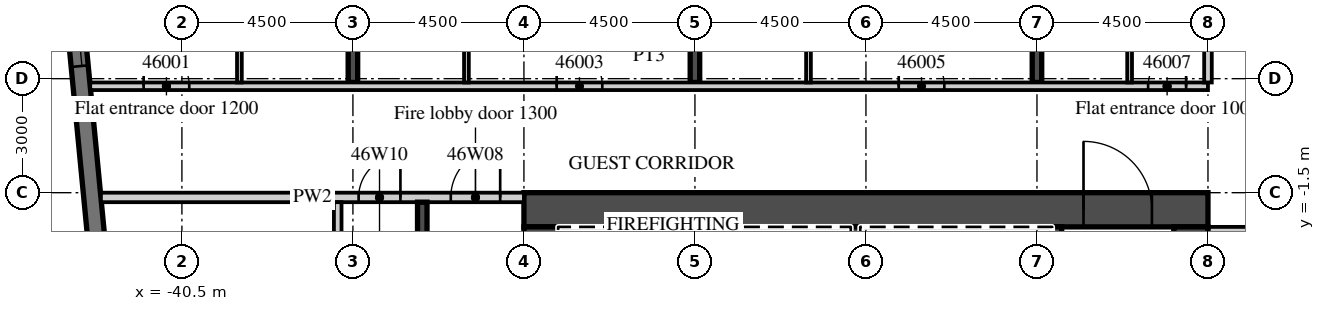
"""IFC4 building model, lengths in metres.
Left out: names, types, materials, properties, quantities, classifications, styles, units other than length and angle.
Written with IfcOpenShell. Run it as: python <this file> out.ifc"""

import sys

from ifc_helpers import new_model, si_unit, direction, frame, frame_2d, origin, place, context, subcontext, project, spatial, rectangle, extrude, element, fill, save


model = new_model("IFC4")
c1 = context("Model", 3, precision=1e-05, world=origin(), true_north=direction((0.0, 1.0)))
c2 = subcontext(c1, "Body", "Model", "MODEL_VIEW")
j1 = project(units=[si_unit("LENGTHUNIT", "METRE"), si_unit("PLANEANGLEUNIT", "RADIAN")], contexts=[c1])
p1 = place(None, origin())
s1 = spatial("IfcSite", under=j1, at=p1, CompositionType="ELEMENT")
p2 = place(p1, origin())
s2 = spatial("IfcBuilding", under=s1, at=p2, CompositionType="ELEMENT")
p3 = place(p2, frame((0.0, 0.0, 193.3)))
s3 = spatial("IfcBuildingStorey", under=s2, at=p3, CompositionType="ELEMENT", Elevation=193.3)
p4 = place(p3, frame((-36.0, 1.4, 0.0), z_axis=(0.0, 0.0, 1.0), x_axis=(0.0, 1.0, 0.0)))
e1 = element("IfcWall", 1, at=p4, inside=s3, PredefinedType="SHEAR", context=c2, shape_type="SweptSolid", body=[
    extrude(rectangle(XDim=15.401, YDim=0.25, at=frame_2d((7.701, 0.0))), origin(), (0.0, 0.0, 1.0), 3.3),
])
p5 = place(p3, frame((-27.0, 1.4, 0.0), z_axis=(0.0, 0.0, 1.0), x_axis=(0.0, 1.0, 0.0)))
e2 = element("IfcWall", 2, at=p5, inside=s3, PredefinedType="SHEAR", context=c2, shape_type="SweptSolid", body=[
    extrude(rectangle(XDim=16.268, YDim=0.25, at=frame_2d((8.134, 0.0))), origin(), (0.0, 0.0, 1.0), 3.3),
])
p6 = place(p3, frame((-18.0, 1.4, 0.0), z_axis=(0.0, 0.0, 1.0), x_axis=(0.0, 1.0, 0.0)))
e3 = element("IfcWall", 3, at=p6, inside=s3, PredefinedType="SHEAR", context=c2, shape_type="SweptSolid", body=[
    extrude(rectangle(XDim=17.134, YDim=0.25, at=frame_2d((8.567, 0.0))), origin(), (0.0, 0.0, 1.0), 3.3),
])
p7 = place(p3, frame((-44.214, 12.466, 0.0), z_axis=(0.0, 0.0, 1.0), x_axis=(0.095847314626, -0.995396047952, 0.0)))
e4 = element("IfcWall", 4, at=p7, inside=s3, PredefinedType="SOLIDWALL", context=c2, shape_type="SweptSolid", body=[
    extrude(rectangle(XDim=34.0, YDim=0.45, at=frame_2d((17.0, 0.0))), origin(), (0.0, 0.0, 1.0), 3.02),
])
p8 = place(p7, frame((2.865, 0.0, 0.45)))
e5 = element("IfcOpeningElement", 5, at=p8, cuts=e4, PredefinedType="OPENING", context=c2, shape_type="SweptSolid", body=[
    extrude(rectangle(XDim=3.3, YDim=2.25, at=frame_2d((1.65, 1.125))), frame((0.0, 0.235, 0.0), z_axis=(0.0, -1.0, 0.0), x_axis=(1.0, 0.0, 0.0)), (0.0, 0.0, 1.0), 0.47),
])
p9 = place(p7, frame((7.386, 0.0, 0.45)))
e6 = element("IfcOpeningElement", 6, at=p9, cuts=e4, PredefinedType="OPENING", context=c2, shape_type="SweptSolid", body=[
    extrude(rectangle(XDim=3.3, YDim=2.25, at=frame_2d((1.65, 1.125))), frame((0.0, 0.235, 0.0), z_axis=(0.0, -1.0, 0.0), x_axis=(1.0, 0.0, 0.0)), (0.0, 0.0, 1.0), 0.47),
])
p10 = place(p3, frame((-42.913, 1.3, 0.0), z_axis=(0.0, 0.0, 1.0), x_axis=(1.0, 0.0, 0.0)))
e7 = element("IfcWall", 7, at=p10, inside=s3, PredefinedType="PARTITIONING", context=c2, shape_type="SweptSolid", body=[
    extrude(rectangle(XDim=29.413, YDim=0.2, at=frame_2d((14.707, 0.0))), origin(), (0.0, 0.0, 1.0), 3.02),
])
p11 = place(p10, frame((1.406, 0.0, 0.0)))
e8 = element("IfcOpeningElement", 8, at=p11, cuts=e7, PredefinedType="OPENING", context=c2, shape_type="SweptSolid", body=[
    extrude(rectangle(XDim=1.2, YDim=2.1, at=frame_2d((0.6, 1.05))), frame((0.0, 0.11, 0.0), z_axis=(0.0, -1.0, 0.0), x_axis=(1.0, 0.0, 0.0)), (0.0, 0.0, 1.0), 0.22),
])
p12 = place(p10, frame((12.275, 0.0, 0.0)))
e9 = element("IfcOpeningElement", 9, at=p12, cuts=e7, PredefinedType="OPENING", context=c2, shape_type="SweptSolid", body=[
    extrude(rectangle(XDim=1.2, YDim=2.1, at=frame_2d((0.6, 1.05))), frame((0.0, 0.11, 0.0), z_axis=(0.0, -1.0, 0.0), x_axis=(1.0, 0.0, 0.0)), (0.0, 0.0, 1.0), 0.22),
])
p13 = place(p10, frame((21.275, 0.0, 0.0)))
e10 = element("IfcOpeningElement", 10, at=p13, cuts=e7, PredefinedType="OPENING", context=c2, shape_type="SweptSolid", body=[
    extrude(rectangle(XDim=1.2, YDim=2.1, at=frame_2d((0.6, 1.05))), frame((0.0, 0.11, 0.0), z_axis=(0.0, -1.0, 0.0), x_axis=(1.0, 0.0, 0.0)), (0.0, 0.0, 1.0), 0.22),
])
p14 = place(p10, frame((27.838, 0.0, 0.0)))
e11 = element("IfcOpeningElement", 11, at=p14, cuts=e7, PredefinedType="OPENING", context=c2, shape_type="SweptSolid", body=[
    extrude(rectangle(XDim=1.0, YDim=2.1, at=frame_2d((0.5, 1.05))), frame((0.0, 0.11, 0.0), z_axis=(0.0, -1.0, 0.0), x_axis=(1.0, 0.0, 0.0)), (0.0, 0.0, 1.0), 0.22),
])
p15 = place(p3, frame((-38.987, 1.4, 0.0), z_axis=(0.0, 0.0, 1.0), x_axis=(0.0, 1.0, 0.0)))
e12 = element("IfcWall", 12, at=p15, inside=s3, PredefinedType="PARTITIONING", context=c2, shape_type="SweptSolid", body=[
    extrude(rectangle(XDim=4.028, YDim=0.125, at=frame_2d((2.014, 0.0))), origin(), (0.0, 0.0, 1.0), 3.02),
])
p16 = place(p15, frame((2.45, 0.0, 0.0)))
e13 = element("IfcOpeningElement", 13, at=p16, cuts=e12, PredefinedType="OPENING", context=c2, shape_type="SweptSolid", body=[
    extrude(rectangle(XDim=0.9, YDim=2.1, at=frame_2d((0.45, 1.05))), frame((0.0, 0.073, 0.0), z_axis=(0.0, -1.0, 0.0), x_axis=(1.0, 0.0, 0.0)), (0.0, 0.0, 1.0), 0.145),
])
p17 = place(p3, frame((-33.013, 1.4, 0.0), z_axis=(0.0, 0.0, 1.0), x_axis=(0.0, 1.0, 0.0)))
e14 = element("IfcWall", 14, at=p17, inside=s3, PredefinedType="PARTITIONING", context=c2, shape_type="SweptSolid", body=[
    extrude(rectangle(XDim=7.225, YDim=0.125, at=frame_2d((3.613, 0.0))), origin(), (0.0, 0.0, 1.0), 3.02),
])
p18 = place(p17, frame((2.45, 0.0, 0.0)))
e15 = element("IfcOpeningElement", 15, at=p18, cuts=e14, PredefinedType="OPENING", context=c2, shape_type="SweptSolid", body=[
    extrude(rectangle(XDim=0.9, YDim=2.1, at=frame_2d((0.45, 1.05))), frame((0.0, 0.073, 0.0), z_axis=(0.0, -1.0, 0.0), x_axis=(1.0, 0.0, 0.0)), (0.0, 0.0, 1.0), 0.145),
])
p19 = place(p3, frame((-24.012, 1.4, 0.0), z_axis=(0.0, 0.0, 1.0), x_axis=(0.0, 1.0, 0.0)))
e16 = element("IfcWall", 16, at=p19, inside=s3, PredefinedType="PARTITIONING", context=c2, shape_type="SweptSolid", body=[
    extrude(rectangle(XDim=7.225, YDim=0.125, at=frame_2d((3.613, 0.0))), origin(), (0.0, 0.0, 1.0), 3.02),
])
p20 = place(p19, frame((2.45, 0.0, 0.0)))
e17 = element("IfcOpeningElement", 17, at=p20, cuts=e16, PredefinedType="OPENING", context=c2, shape_type="SweptSolid", body=[
    extrude(rectangle(XDim=0.9, YDim=2.1, at=frame_2d((0.45, 1.05))), frame((0.0, 0.073, 0.0), z_axis=(0.0, -1.0, 0.0), x_axis=(1.0, 0.0, 0.0)), (0.0, 0.0, 1.0), 0.145),
])
p21 = place(p3, frame((-13.5, 1.4, 0.0), z_axis=(0.0, 0.0, 1.0), x_axis=(0.0, 1.0, 0.0)))
e18 = element("IfcWall", 18, at=p21, inside=s3, PredefinedType="PARTITIONING", context=c2, shape_type="SweptSolid", body=[
    extrude(rectangle(XDim=17.59, YDim=0.2, at=frame_2d((8.795, 0.0))), origin(), (0.0, 0.0, 1.0), 3.02),
])
p22 = place(p3, frame((-15.562, 1.4, 0.0), z_axis=(0.0, 0.0, 1.0), x_axis=(0.0, 1.0, 0.0)))
e19 = element("IfcWall", 19, at=p22, inside=s3, PredefinedType="PARTITIONING", context=c2, shape_type="SweptSolid", body=[
    extrude(rectangle(XDim=7.225, YDim=0.125, at=frame_2d((3.613, 0.0))), origin(), (0.0, 0.0, 1.0), 3.02),
])
p23 = place(p22, frame((2.45, 0.0, 0.0)))
e20 = element("IfcOpeningElement", 20, at=p23, cuts=e19, PredefinedType="OPENING", context=c2, shape_type="SweptSolid", body=[
    extrude(rectangle(XDim=0.9, YDim=2.1, at=frame_2d((0.45, 1.05))), frame((0.0, 0.073, 0.0), z_axis=(0.0, -1.0, 0.0), x_axis=(1.0, 0.0, 0.0)), (0.0, 0.0, 1.0), 0.145),
])
p24 = place(p3, frame((-13.5, -2.5, 0.0), z_axis=(0.0, 0.0, 1.0), x_axis=(1.0, 0.0, 0.0)))
e21 = element("IfcWall", 21, at=p24, inside=s3, PredefinedType="PARTITIONING", context=c2, shape_type="SweptSolid", body=[
    extrude(rectangle(XDim=27.0, YDim=0.2, at=frame_2d((13.5, 0.0))), origin(), (0.0, 0.0, 1.0), 3.02),
])
p25 = place(p24, frame((2.925, 0.0, 0.0)))
e22 = element("IfcOpeningElement", 22, at=p25, cuts=e21, PredefinedType="OPENING", context=c2, shape_type="SweptSolid", body=[
    extrude(rectangle(XDim=1.0, YDim=2.1, at=frame_2d((0.5, 1.05))), frame((0.0, 0.11, 0.0), z_axis=(0.0, -1.0, 0.0), x_axis=(1.0, 0.0, 0.0)), (0.0, 0.0, 1.0), 0.22),
])
p26 = place(p24, frame((5.075, 0.0, 0.0)))
e23 = element("IfcOpeningElement", 23, at=p26, cuts=e21, PredefinedType="OPENING", context=c2, shape_type="SweptSolid", body=[
    extrude(rectangle(XDim=1.0, YDim=2.1, at=frame_2d((0.5, 1.05))), frame((0.0, 0.11, 0.0), z_axis=(0.0, -1.0, 0.0), x_axis=(1.0, 0.0, 0.0)), (0.0, 0.0, 1.0), 0.22),
])
p27 = place(p24, frame((11.925, 0.0, 0.0)))
e24 = element("IfcOpeningElement", 24, at=p27, cuts=e21, PredefinedType="OPENING", context=c2, shape_type="SweptSolid", body=[
    extrude(rectangle(XDim=1.0, YDim=2.1, at=frame_2d((0.5, 1.05))), frame((0.0, 0.11, 0.0), z_axis=(0.0, -1.0, 0.0), x_axis=(1.0, 0.0, 0.0)), (0.0, 0.0, 1.0), 0.22),
])
p28 = place(p24, frame((15.938, 0.0, 0.0)))
e25 = element("IfcOpeningElement", 25, at=p28, cuts=e21, PredefinedType="OPENING", context=c2, shape_type="SweptSolid", body=[
    extrude(rectangle(XDim=1.2, YDim=2.1, at=frame_2d((0.6, 1.05))), frame((0.0, 0.11, 0.0), z_axis=(0.0, -1.0, 0.0), x_axis=(1.0, 0.0, 0.0)), (0.0, 0.0, 1.0), 0.22),
])
p29 = place(p24, frame((25.425, 0.0, 0.0)))
e26 = element("IfcOpeningElement", 26, at=p29, cuts=e21, PredefinedType="OPENING", context=c2, shape_type="SweptSolid", body=[
    extrude(rectangle(XDim=1.0, YDim=2.1, at=frame_2d((0.5, 1.05))), frame((0.0, 0.11, 0.0), z_axis=(0.0, -1.0, 0.0), x_axis=(1.0, 0.0, 0.0)), (0.0, 0.0, 1.0), 0.22),
])
p30 = place(p3, frame((-31.5, -1.95, 0.0), z_axis=(0.0, 0.0, 1.0), x_axis=(1.0, 0.0, 0.0)))
e27 = element("IfcWall", 27, at=p30, inside=s3, PredefinedType="SHEAR", context=c2, shape_type="SweptSolid", body=[
    extrude(rectangle(XDim=18.0, YDim=0.9, at=frame_2d((9.0, 0.0))), origin(), (0.0, 0.0, 1.0), 3.02),
])
p31 = place(p30, frame((14.725, 0.0, 0.0)))
e28 = element("IfcOpeningElement", 28, at=p31, cuts=e27, PredefinedType="OPENING", context=c2, shape_type="SweptSolid", body=[
    extrude(rectangle(XDim=1.8, YDim=2.1, at=frame_2d((0.9, 1.05))), frame((0.0, 0.46, 0.0), z_axis=(0.0, -1.0, 0.0), x_axis=(1.0, 0.0, 0.0)), (0.0, 0.0, 1.0), 0.92),
])
p32 = place(p3, frame((-31.05, -15.2, 0.0), z_axis=(0.0, 0.0, 1.0), x_axis=(0.0, 1.0, 0.0)))
e29 = element("IfcWall", 29, at=p32, inside=s3, PredefinedType="SHEAR", context=c2, shape_type="SweptSolid", body=[
    extrude(rectangle(XDim=12.8, YDim=0.9, at=frame_2d((6.4, 0.0))), origin(), (0.0, 0.0, 1.0), 3.02),
])
p33 = place(p32, frame((11.5, 0.0, 0.0)))
e30 = element("IfcOpeningElement", 30, at=p33, cuts=e29, PredefinedType="OPENING", context=c2, shape_type="SweptSolid", body=[
    extrude(rectangle(XDim=1.1, YDim=2.1, at=frame_2d((0.55, 1.05))), frame((0.0, 0.46, 0.0), z_axis=(0.0, -1.0, 0.0), x_axis=(1.0, 0.0, 0.0)), (0.0, 0.0, 1.0), 0.92),
])
p34 = place(p3, frame((-13.95, -14.6, 0.0), z_axis=(0.0, 0.0, 1.0), x_axis=(0.0, 1.0, 0.0)))
e31 = element("IfcWall", 31, at=p34, inside=s3, PredefinedType="SHEAR", context=c2, shape_type="SweptSolid", body=[
    extrude(rectangle(XDim=12.2, YDim=0.9, at=frame_2d((6.1, 0.0))), origin(), (0.0, 0.0, 1.0), 3.02),
])
p35 = place(p3, frame((-17.475, -5.55, 0.0), z_axis=(0.0, 0.0, 1.0), x_axis=(0.0, 1.0, 0.0)))
e32 = element("IfcWall", 32, at=p35, inside=s3, PredefinedType="SHEAR", context=c2, shape_type="SweptSolid", body=[
    extrude(rectangle(XDim=3.15, YDim=0.25, at=frame_2d((1.575, 0.0))), origin(), (0.0, 0.0, 1.0), 3.02),
])
for number, where, z_axis, x_axis in (
    (33, (-27.975, -5.3, 0.0), (0.0, 0.0, 1.0), (0.0, 1.0, 0.0)),
    (34, (-22.775, -5.3, 0.0), (0.0, 0.0, 1.0), (0.0, 1.0, 0.0)),
):
    element("IfcWall", number, at=place(p3, frame(where, z_axis=z_axis, x_axis=x_axis)), inside=s3, PredefinedType="SHEAR", context=c2, shape_type="SweptSolid", body=[
        extrude(rectangle(XDim=2.9, YDim=0.25, at=frame_2d((1.45, 0.0))), origin(), (0.0, 0.0, 1.0), 3.02),
    ])
p36 = place(p3, frame((-42.632, -1.625, 0.0), z_axis=(0.0, 0.0, 1.0), x_axis=(1.0, 0.0, 0.0)))
e35 = element("IfcWall", 35, at=p36, inside=s3, PredefinedType="PARTITIONING", context=c2, shape_type="SweptSolid", body=[
    extrude(rectangle(XDim=11.132, YDim=0.25, at=frame_2d((5.566, 0.0))), origin(), (0.0, 0.0, 1.0), 3.02),
])
p37 = place(p36, frame((9.207, 0.0, 0.0)))
e36 = element("IfcOpeningElement", 36, at=p37, cuts=e35, PredefinedType="OPENING", context=c2, shape_type="SweptSolid", body=[
    extrude(rectangle(XDim=1.3, YDim=2.1, at=frame_2d((0.65, 1.05))), frame((0.0, 0.135, 0.0), z_axis=(0.0, -1.0, 0.0), x_axis=(1.0, 0.0, 0.0)), (0.0, 0.0, 1.0), 0.27),
])
p38 = place(p36, frame((6.781, 0.0, 0.0)))
e37 = element("IfcOpeningElement", 37, at=p38, cuts=e35, PredefinedType="OPENING", context=c2, shape_type="SweptSolid", body=[
    extrude(rectangle(XDim=1.1, YDim=2.1, at=frame_2d((0.55, 1.05))), frame((0.0, 0.135, 0.0), z_axis=(0.0, -1.0, 0.0), x_axis=(1.0, 0.0, 0.0)), (0.0, 0.0, 1.0), 0.27),
])
p39 = place(p3, frame((-34.175, -10.1, 0.0), z_axis=(0.0, 0.0, 1.0), x_axis=(0.0, 1.0, 0.0)))
e38 = element("IfcWall", 38, at=p39, inside=s3, PredefinedType="SHEAR", context=c2, shape_type="SweptSolid", body=[
    extrude(rectangle(XDim=8.35, YDim=0.25, at=frame_2d((4.175, 0.0))), origin(), (0.0, 0.0, 1.0), 3.02),
])
p40 = place(p3, frame((-36.4, -17.7, 0.0), z_axis=(0.0, 0.0, 1.0), x_axis=(0.0, 1.0, 0.0)))
e39 = element("IfcWall", 39, at=p40, inside=s3, PredefinedType="PARTITIONING", context=c2, shape_type="SweptSolid", body=[
    extrude(rectangle(XDim=15.95, YDim=0.2, at=frame_2d((7.975, 0.0))), origin(), (0.0, 0.0, 1.0), 3.02),
])
p41 = place(p40, frame((0.35, 0.0, 0.0)))
e40 = element("IfcOpeningElement", 40, at=p41, cuts=e39, PredefinedType="OPENING", context=c2, shape_type="SweptSolid", body=[
    extrude(rectangle(XDim=0.9, YDim=2.1, at=frame_2d((0.45, 1.05))), frame((0.0, 0.11, 0.0), z_axis=(0.0, -1.0, 0.0), x_axis=(1.0, 0.0, 0.0)), (0.0, 0.0, 1.0), 0.22),
])
p42 = place(p9, origin())
e41 = element("IfcWindow", 41, at=p42, inside=s3, PartitioningType="SINGLE_PANEL", PredefinedType="WINDOW", context=c2, shape_type="SweptSolid", body=[
    extrude(rectangle(XDim=3.3, YDim=2.25, at=frame_2d((1.65, 1.125))), frame((0.0, 0.09, 0.0), z_axis=(0.0, -1.0, 0.0), x_axis=(1.0, 0.0, 0.0)), (0.0, 0.0, 1.0), 0.06),
])
fill(e6, e41)
p43 = place(p11, origin())
e42 = element("IfcDoor", 42, at=p43, inside=s3, OperationType="SINGLE_SWING_LEFT", PredefinedType="DOOR", context=c2, shape_type="SweptSolid", body=[
    extrude(rectangle(XDim=1.2, YDim=2.1, at=frame_2d((0.6, 1.05))), frame((0.0, 0.025, 0.0), z_axis=(0.0, -1.0, 0.0), x_axis=(1.0, 0.0, 0.0)), (0.0, 0.0, 1.0), 0.05),
])
fill(e8, e42)
p44 = place(p12, origin())
e43 = element("IfcDoor", 43, at=p44, inside=s3, OperationType="SINGLE_SWING_LEFT", PredefinedType="DOOR", context=c2, shape_type="SweptSolid", body=[
    extrude(rectangle(XDim=1.2, YDim=2.1, at=frame_2d((0.6, 1.05))), frame((0.0, 0.025, 0.0), z_axis=(0.0, -1.0, 0.0), x_axis=(1.0, 0.0, 0.0)), (0.0, 0.0, 1.0), 0.05),
])
fill(e9, e43)
p45 = place(p13, origin())
e44 = element("IfcDoor", 44, at=p45, inside=s3, OperationType="SINGLE_SWING_LEFT", PredefinedType="DOOR", context=c2, shape_type="SweptSolid", body=[
    extrude(rectangle(XDim=1.2, YDim=2.1, at=frame_2d((0.6, 1.05))), frame((0.0, 0.025, 0.0), z_axis=(0.0, -1.0, 0.0), x_axis=(1.0, 0.0, 0.0)), (0.0, 0.0, 1.0), 0.05),
])
fill(e10, e44)
p46 = place(p14, origin())
e45 = element("IfcDoor", 45, at=p46, inside=s3, OperationType="SINGLE_SWING_RIGHT", PredefinedType="DOOR", context=c2, shape_type="SweptSolid", body=[
    extrude(rectangle(XDim=1.0, YDim=2.1, at=frame_2d((0.5, 1.05))), frame((0.0, 0.025, 0.0), z_axis=(0.0, -1.0, 0.0), x_axis=(1.0, 0.0, 0.0)), (0.0, 0.0, 1.0), 0.05),
])
fill(e11, e45)
p47 = place(p31, origin())
e46 = element("IfcDoor", 46, at=p47, inside=s3, OperationType="DOUBLE_DOOR_DOUBLE_SWING", PredefinedType="DOOR", context=c2, shape_type="SweptSolid", body=[
    extrude(rectangle(XDim=1.8, YDim=2.1, at=frame_2d((0.9, 1.05))), frame((0.0, 0.025, 0.0), z_axis=(0.0, -1.0, 0.0), x_axis=(1.0, 0.0, 0.0)), (0.0, 0.0, 1.0), 0.05),
])
fill(e28, e46)
p48 = place(p37, origin())
e47 = element("IfcDoor", 47, at=p48, inside=s3, OperationType="SINGLE_SWING_RIGHT", PredefinedType="DOOR", context=c2, shape_type="SweptSolid", body=[
    extrude(rectangle(XDim=1.3, YDim=2.1, at=frame_2d((0.65, 1.05))), frame((0.0, 0.025, 0.0), z_axis=(0.0, -1.0, 0.0), x_axis=(1.0, 0.0, 0.0)), (0.0, 0.0, 1.0), 0.05),
])
fill(e36, e47)
p49 = place(p38, origin())
e48 = element("IfcDoor", 48, at=p49, inside=s3, OperationType="SINGLE_SWING_RIGHT", PredefinedType="DOOR", context=c2, shape_type="SweptSolid", body=[
    extrude(rectangle(XDim=1.1, YDim=2.1, at=frame_2d((0.55, 1.05))), frame((0.0, 0.025, 0.0), z_axis=(0.0, -1.0, 0.0), x_axis=(1.0, 0.0, 0.0)), (0.0, 0.0, 1.0), 0.05),
])
fill(e37, e48)
save(model, sys.argv[1])
